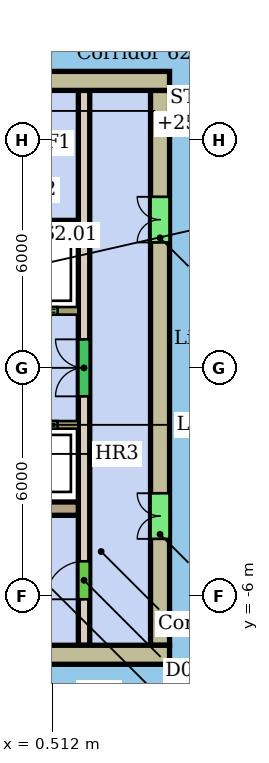
"""IFC4 building model, lengths in metres.
Left out: names, types, materials, properties, quantities, classifications, styles, units other than length and angle.
Written with IfcOpenShell. Run it as: python <this file> out.ifc"""

import sys

from ifc_helpers import new_model, si_unit, direction, frame, frame_2d, origin, place, context, subcontext, project, spatial, rectangle, extrude, element, fill, save


model = new_model("IFC4")
c1 = context("Model", 3, precision=1e-05, world=origin(), true_north=direction((0.0, 1.0)))
c2 = subcontext(c1, "Body", "Model", "MODEL_VIEW")
j1 = project(units=[si_unit("LENGTHUNIT", "METRE"), si_unit("PLANEANGLEUNIT", "RADIAN")], contexts=[c1])
p1 = place(None, origin())
s1 = spatial("IfcSite", under=j1, at=p1, CompositionType="ELEMENT")
p2 = place(p1, origin())
s2 = spatial("IfcBuilding", under=s1, at=p2, CompositionType="ELEMENT")
p3 = place(p2, frame((0.0, 0.0, 254.1)))
s3 = spatial("IfcBuildingStorey", under=s2, at=p3, CompositionType="ELEMENT", Elevation=254.1)
p4 = place(p3, frame((3.6, 7.55, 0.0), z_axis=(0.0, 0.0, 1.0), x_axis=(-1.0, 0.0, 0.0)))
e1 = element("IfcWall", 1, at=p4, inside=s3, PredefinedType="SHEAR", context=c2, shape_type="SweptSolid", body=[
    extrude(rectangle(XDim=9.6, YDim=0.5, at=frame_2d((4.8, 0.0))), origin(), (0.0, 0.0, 1.0), 3.3),
])
p5 = place(p4, frame((3.2, 0.0, 0.0)))
e2 = element("IfcOpeningElement", 2, at=p5, cuts=e1, PredefinedType="OPENING", context=c2, shape_type="SweptSolid", body=[
    extrude(rectangle(XDim=1.2, YDim=2.1, at=frame_2d((0.6, 1.05))), frame((0.0, 0.26, 0.0), z_axis=(0.0, -1.0, 0.0), x_axis=(1.0, 0.0, 0.0)), (0.0, 0.0, 1.0), 0.52),
])
p6 = place(p3, frame((-15.6, -7.55, 0.0), z_axis=(0.0, 0.0, 1.0), x_axis=(1.0, 0.0, 0.0)))
e3 = element("IfcWall", 3, at=p6, inside=s3, PredefinedType="SHEAR", context=c2, shape_type="SweptSolid", body=[
    extrude(rectangle(XDim=19.2, YDim=0.5, at=frame_2d((9.6, 0.0))), origin(), (0.0, 0.0, 1.0), 3.3),
])
p7 = place(p6, frame((3.6, 0.0, 0.0)))
e4 = element("IfcOpeningElement", 4, at=p7, cuts=e3, PredefinedType="OPENING", context=c2, shape_type="SweptSolid", body=[
    extrude(rectangle(XDim=1.2, YDim=2.1, at=frame_2d((0.6, 1.05))), frame((0.0, 0.26, 0.0), z_axis=(0.0, -1.0, 0.0), x_axis=(1.0, 0.0, 0.0)), (0.0, 0.0, 1.0), 0.52),
])
p8 = place(p3, frame((3.35, -7.3, 0.0), z_axis=(0.0, 0.0, 1.0), x_axis=(0.0, 1.0, 0.0)))
e5 = element("IfcWall", 5, at=p8, inside=s3, PredefinedType="SHEAR", context=c2, shape_type="SweptSolid", body=[
    extrude(rectangle(XDim=14.6, YDim=0.5, at=frame_2d((7.3, 0.0))), origin(), (0.0, 0.0, 1.0), 3.3),
])
p9 = place(p8, frame((2.8, 0.0, 0.0)))
e6 = element("IfcOpeningElement", 6, at=p9, cuts=e5, PredefinedType="OPENING", context=c2, shape_type="SweptSolid", body=[
    extrude(rectangle(XDim=1.2, YDim=2.1, at=frame_2d((0.6, 1.05))), frame((0.0, 0.26, 0.0), z_axis=(0.0, -1.0, 0.0), x_axis=(1.0, 0.0, 0.0)), (0.0, 0.0, 1.0), 0.52),
])
p10 = place(p8, frame((10.6, 0.0, 0.0)))
e7 = element("IfcOpeningElement", 7, at=p10, cuts=e5, PredefinedType="OPENING", context=c2, shape_type="SweptSolid", body=[
    extrude(rectangle(XDim=1.2, YDim=2.1, at=frame_2d((0.6, 1.05))), frame((0.0, 0.26, 0.0), z_axis=(0.0, -1.0, 0.0), x_axis=(1.0, 0.0, 0.0)), (0.0, 0.0, 1.0), 0.52),
])
for number, where, z_axis, x_axis in (
    (8, (-6.0, 3.705, 0.0), (0.0, 0.0, 1.0), (1.0, 0.0, 0.0)),
    (9, (-6.0, -3.705, 0.0), (0.0, 0.0, 1.0), (1.0, 0.0, 0.0)),
):
    element("IfcWall", number, at=place(p3, frame(where, z_axis=z_axis, x_axis=x_axis)), inside=s3, PredefinedType="SHEAR", context=c2, shape_type="SweptSolid", body=[
        extrude(rectangle(XDim=7.2, YDim=0.35, at=frame_2d((3.6, 0.0))), origin(), (0.0, 0.0, 1.0), 3.3),
    ])
p11 = place(p3, frame((1.35, -7.3, 0.0), z_axis=(0.0, 0.0, 1.0), x_axis=(0.0, 1.0, 0.0)))
e10 = element("IfcWall", 10, at=p11, inside=s3, PredefinedType="SHEAR", context=c2, shape_type="SweptSolid", body=[
    extrude(rectangle(XDim=14.6, YDim=0.3, at=frame_2d((7.3, 0.0))), origin(), (0.0, 0.0, 1.0), 3.3),
])
p12 = place(p11, frame((1.21, 0.0, 0.0)))
e11 = element("IfcOpeningElement", 11, at=p12, cuts=e10, PredefinedType="OPENING", context=c2, shape_type="SweptSolid", body=[
    extrude(rectangle(XDim=1.0, YDim=2.1, at=frame_2d((0.5, 1.05))), frame((0.0, 0.16, 0.0), z_axis=(0.0, -1.0, 0.0), x_axis=(1.0, 0.0, 0.0)), (0.0, 0.0, 1.0), 0.32),
])
p13 = place(p11, frame((6.55, 0.0, 0.0)))
e12 = element("IfcOpeningElement", 12, at=p13, cuts=e10, PredefinedType="OPENING", context=c2, shape_type="SweptSolid", body=[
    extrude(rectangle(XDim=1.5, YDim=2.1, at=frame_2d((0.75, 1.05))), frame((0.0, 0.16, 0.0), z_axis=(0.0, -1.0, 0.0), x_axis=(1.0, 0.0, 0.0)), (0.0, 0.0, 1.0), 0.32),
])
p14 = place(p3, frame((-13.2, 1.5, 0.0), z_axis=(0.0, 0.0, 1.0), x_axis=(1.0, 0.0, 0.0)))
e13 = element("IfcWall", 13, at=p14, inside=s3, PredefinedType="SHEAR", context=c2, shape_type="SweptSolid", body=[
    extrude(rectangle(XDim=14.4, YDim=0.2, at=frame_2d((7.2, 0.0))), origin(), (0.0, 0.0, 1.0), 3.3),
])
p15 = place(p14, frame((10.312, 0.0, 0.0)))
e14 = element("IfcOpeningElement", 14, at=p15, cuts=e13, PredefinedType="OPENING", context=c2, shape_type="SweptSolid", body=[
    extrude(rectangle(XDim=1.1, YDim=2.1, at=frame_2d((0.55, 1.05))), frame((0.0, 0.11, 0.0), z_axis=(0.0, -1.0, 0.0), x_axis=(1.0, 0.0, 0.0)), (0.0, 0.0, 1.0), 0.22),
])
p16 = place(p14, frame((12.754, 0.0, 0.0)))
e15 = element("IfcOpeningElement", 15, at=p16, cuts=e13, PredefinedType="OPENING", context=c2, shape_type="SweptSolid", body=[
    extrude(rectangle(XDim=1.1, YDim=2.1, at=frame_2d((0.55, 1.05))), frame((0.0, 0.11, 0.0), z_axis=(0.0, -1.0, 0.0), x_axis=(1.0, 0.0, 0.0)), (0.0, 0.0, 1.0), 0.22),
])
p17 = place(p14, frame((0.15, 0.0, 0.0)))
e16 = element("IfcOpeningElement", 16, at=p17, cuts=e13, PredefinedType="OPENING", context=c2, shape_type="SweptSolid", body=[
    extrude(rectangle(XDim=0.9, YDim=2.1, at=frame_2d((0.45, 1.05))), frame((0.0, 0.11, 0.0), z_axis=(0.0, -1.0, 0.0), x_axis=(1.0, 0.0, 0.0)), (0.0, 0.0, 1.0), 0.22),
])
p18 = place(p14, frame((4.222, 0.0, 0.0)))
e17 = element("IfcOpeningElement", 17, at=p18, cuts=e13, PredefinedType="OPENING", context=c2, shape_type="SweptSolid", body=[
    extrude(rectangle(XDim=0.9, YDim=2.1, at=frame_2d((0.45, 1.05))), frame((0.0, 0.11, 0.0), z_axis=(0.0, -1.0, 0.0), x_axis=(1.0, 0.0, 0.0)), (0.0, 0.0, 1.0), 0.22),
])
p19 = place(p14, frame((8.367, 0.0, 0.0)))
e18 = element("IfcOpeningElement", 18, at=p19, cuts=e13, PredefinedType="OPENING", context=c2, shape_type="SweptSolid", body=[
    extrude(rectangle(XDim=1.0, YDim=2.1, at=frame_2d((0.5, 1.05))), frame((0.0, 0.11, 0.0), z_axis=(0.0, -1.0, 0.0), x_axis=(1.0, 0.0, 0.0)), (0.0, 0.0, 1.0), 0.22),
])
p20 = place(p3, frame((1.2, -1.5, 0.0), z_axis=(0.0, 0.0, 1.0), x_axis=(-1.0, 0.0, 0.0)))
e19 = element("IfcWall", 19, at=p20, inside=s3, PredefinedType="SHEAR", context=c2, shape_type="SweptSolid", body=[
    extrude(rectangle(XDim=14.4, YDim=0.2, at=frame_2d((7.2, 0.0))), origin(), (0.0, 0.0, 1.0), 3.3),
])
p21 = place(p20, frame((7.821, 0.0, 0.0)))
e20 = element("IfcOpeningElement", 20, at=p21, cuts=e19, PredefinedType="OPENING", context=c2, shape_type="SweptSolid", body=[
    extrude(rectangle(XDim=1.2, YDim=2.1, at=frame_2d((0.6, 1.05))), frame((0.0, 0.11, 0.0), z_axis=(0.0, -1.0, 0.0), x_axis=(1.0, 0.0, 0.0)), (0.0, 0.0, 1.0), 0.22),
])
p22 = place(p20, frame((0.546, 0.0, 0.0)))
e21 = element("IfcOpeningElement", 21, at=p22, cuts=e19, PredefinedType="OPENING", context=c2, shape_type="SweptSolid", body=[
    extrude(rectangle(XDim=1.1, YDim=2.1, at=frame_2d((0.55, 1.05))), frame((0.0, 0.11, 0.0), z_axis=(0.0, -1.0, 0.0), x_axis=(1.0, 0.0, 0.0)), (0.0, 0.0, 1.0), 0.22),
])
p23 = place(p20, frame((4.983, 0.0, 0.0)))
e22 = element("IfcOpeningElement", 22, at=p23, cuts=e19, PredefinedType="OPENING", context=c2, shape_type="SweptSolid", body=[
    extrude(rectangle(XDim=1.0, YDim=2.1, at=frame_2d((0.5, 1.05))), frame((0.0, 0.11, 0.0), z_axis=(0.0, -1.0, 0.0), x_axis=(1.0, 0.0, 0.0)), (0.0, 0.0, 1.0), 0.22),
])
p24 = place(p20, frame((2.592, 0.0, 0.0)))
e23 = element("IfcOpeningElement", 23, at=p24, cuts=e19, PredefinedType="OPENING", context=c2, shape_type="SweptSolid", body=[
    extrude(rectangle(XDim=1.0, YDim=2.1, at=frame_2d((0.5, 1.05))), frame((0.0, 0.11, 0.0), z_axis=(0.0, -1.0, 0.0), x_axis=(1.0, 0.0, 0.0)), (0.0, 0.0, 1.0), 0.22),
])
p25 = place(p9, origin())
e24 = element("IfcDoor", 24, at=p25, inside=s3, OperationType="DOUBLE_DOOR_SINGLE_SWING", PredefinedType="NOTDEFINED", context=c2, shape_type="SweptSolid", body=[
    extrude(rectangle(XDim=1.2, YDim=2.1, at=frame_2d((0.6, 1.05))), frame((0.0, 0.025, 0.0), z_axis=(0.0, -1.0, 0.0), x_axis=(1.0, 0.0, 0.0)), (0.0, 0.0, 1.0), 0.05),
])
fill(e6, e24)
p26 = place(p10, origin())
e25 = element("IfcDoor", 25, at=p26, inside=s3, OperationType="DOUBLE_DOOR_SINGLE_SWING", PredefinedType="NOTDEFINED", context=c2, shape_type="SweptSolid", body=[
    extrude(rectangle(XDim=1.2, YDim=2.1, at=frame_2d((0.6, 1.05))), frame((0.0, 0.025, 0.0), z_axis=(0.0, -1.0, 0.0), x_axis=(1.0, 0.0, 0.0)), (0.0, 0.0, 1.0), 0.05),
])
fill(e7, e25)
p27 = place(p12, origin())
e26 = element("IfcDoor", 26, at=p27, inside=s3, OperationType="SINGLE_SWING_LEFT", PredefinedType="NOTDEFINED", context=c2, shape_type="SweptSolid", body=[
    extrude(rectangle(XDim=1.0, YDim=2.1, at=frame_2d((0.5, 1.05))), frame((0.0, 0.025, 0.0), z_axis=(0.0, -1.0, 0.0), x_axis=(1.0, 0.0, 0.0)), (0.0, 0.0, 1.0), 0.05),
])
fill(e11, e26)
p28 = place(p13, origin())
e27 = element("IfcDoor", 27, at=p28, inside=s3, OperationType="DOUBLE_DOOR_SINGLE_SWING", PredefinedType="NOTDEFINED", context=c2, shape_type="SweptSolid", body=[
    extrude(rectangle(XDim=1.5, YDim=2.1, at=frame_2d((0.75, 1.05))), frame((0.0, 0.025, 0.0), z_axis=(0.0, -1.0, 0.0), x_axis=(1.0, 0.0, 0.0)), (0.0, 0.0, 1.0), 0.05),
])
fill(e12, e27)
p29 = place(p16, origin())
e28 = element("IfcDoor", 28, at=p29, inside=s3, OperationType="DOUBLE_DOOR_SLIDING", PredefinedType="NOTDEFINED", context=c2, shape_type="SweptSolid", body=[
    extrude(rectangle(XDim=1.1, YDim=2.1, at=frame_2d((0.55, 1.05))), frame((0.0, 0.025, 0.0), z_axis=(0.0, -1.0, 0.0), x_axis=(1.0, 0.0, 0.0)), (0.0, 0.0, 1.0), 0.05),
])
fill(e15, e28)
p30 = place(p22, origin())
e29 = element("IfcDoor", 29, at=p30, inside=s3, OperationType="DOUBLE_DOOR_SLIDING", PredefinedType="NOTDEFINED", context=c2, shape_type="SweptSolid", body=[
    extrude(rectangle(XDim=1.1, YDim=2.1, at=frame_2d((0.55, 1.05))), frame((0.0, 0.025, 0.0), z_axis=(0.0, -1.0, 0.0), x_axis=(1.0, 0.0, 0.0)), (0.0, 0.0, 1.0), 0.05),
])
fill(e21, e29)
save(model, sys.argv[1])
